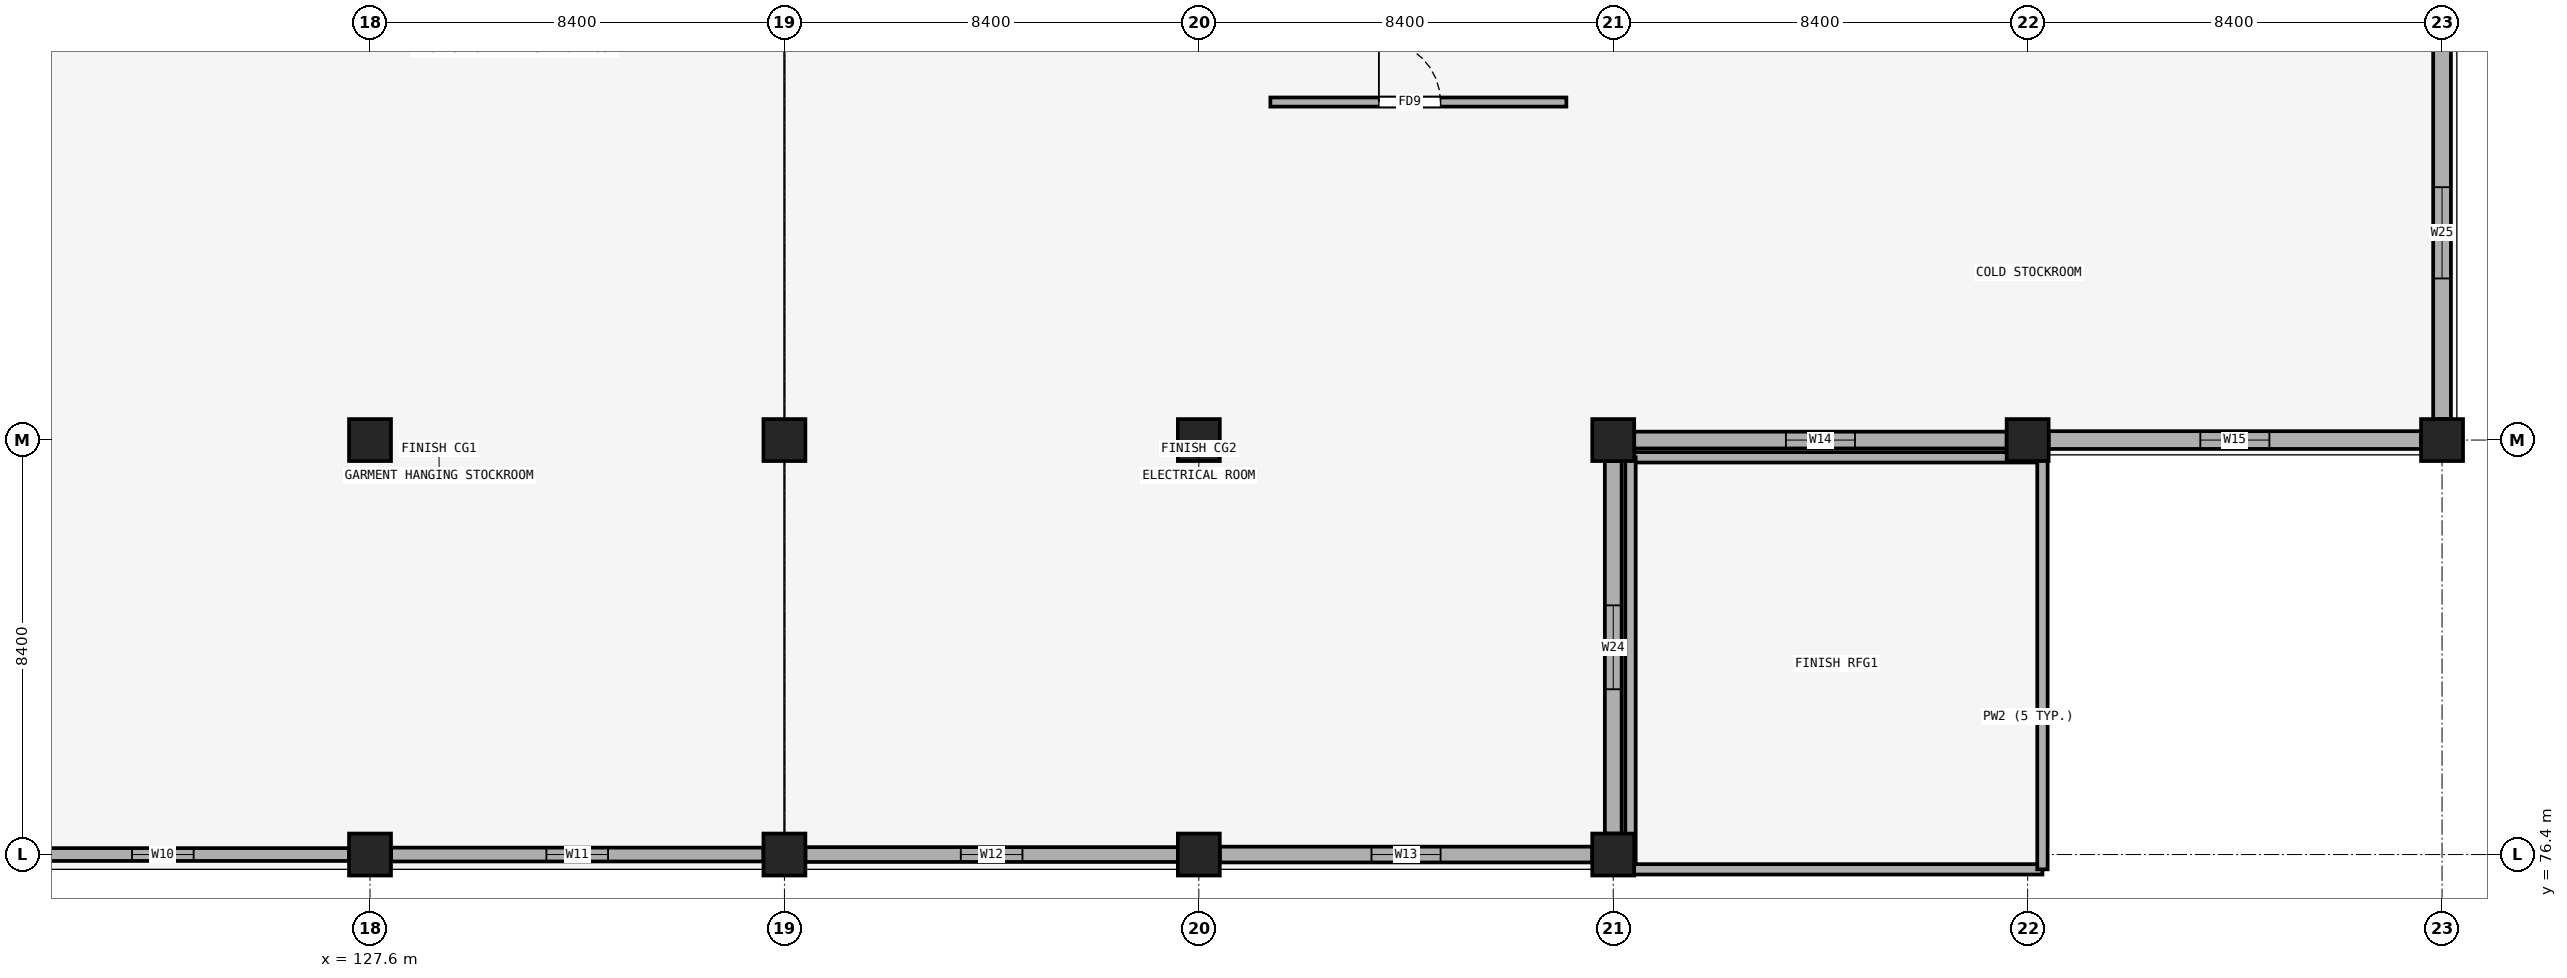
"""IFC4 building model, lengths in metres.
Left out: names, types, materials, properties, quantities, classifications, styles, units other than length and angle.
Written with IfcOpenShell. Run it as: python <this file> out.ifc"""

import sys

from ifc_helpers import new_model, si_unit, direction, frame, frame_2d, origin, origin_2d, place, context, subcontext, project, spatial, rectangle, extrude, element, fill, save


model = new_model("IFC4")
c1 = context("Model", 3, precision=1e-05, world=origin(), true_north=direction((0.0, 1.0)))
c2 = subcontext(c1, "Body", "Model", "MODEL_VIEW")
j1 = project(units=[si_unit("LENGTHUNIT", "METRE"), si_unit("PLANEANGLEUNIT", "RADIAN")], contexts=[c1])
p1 = place(None, origin())
s1 = spatial("IfcSite", under=j1, at=p1, CompositionType="ELEMENT")
p2 = place(p1, origin())
s2 = spatial("IfcBuilding", under=s1, at=p2, CompositionType="ELEMENT")
p3 = place(p2, frame((0.0, 0.0, 5.4)))
s3 = spatial("IfcBuildingStorey", under=s2, at=p3, CompositionType="ELEMENT", Elevation=5.4)
for number, where, z_axis, x_axis in (
    (1, (127.6, 76.4, 0.0), (0.0, 0.0, 1.0), (1.0, 0.0, 0.0)),
    (2, (136.0, 76.4, 0.0), (0.0, 0.0, 1.0), (1.0, 0.0, 0.0)),
    (3, (144.4, 76.4, 0.0), (0.0, 0.0, 1.0), (1.0, 0.0, 0.0)),
    (4, (152.8, 76.4, 0.0), (0.0, 0.0, 1.0), (1.0, 0.0, 0.0)),
    (5, (127.6, 84.8, 0.0), (0.0, 0.0, 1.0), (1.0, 0.0, 0.0)),
    (6, (136.0, 84.8, 0.0), (0.0, 0.0, 1.0), (1.0, 0.0, 0.0)),
    (7, (144.4, 84.8, 0.0), (0.0, 0.0, 1.0), (1.0, 0.0, 0.0)),
    (8, (152.8, 84.8, 0.0), (0.0, 0.0, 1.0), (1.0, 0.0, 0.0)),
    (9, (161.2, 84.8, 0.0), (0.0, 0.0, 1.0), (1.0, 0.0, 0.0)),
    (10, (169.6, 84.8, 0.0), (0.0, 0.0, 1.0), (1.0, 0.0, 0.0)),
):
    element("IfcColumn", number, at=place(p3, frame(where, z_axis=z_axis, x_axis=x_axis)), inside=s3, PredefinedType="COLUMN", context=c2, shape_type="SweptSolid", body=[
        extrude(rectangle(XDim=0.85, YDim=0.85, at=origin_2d()), origin(), (0.0, 0.0, 1.0), 4.5),
    ])
p4 = place(p3, frame((119.625, 76.4, 0.0), z_axis=(0.0, 0.0, 1.0), x_axis=(1.0, 0.0, 0.0)))
e11 = element("IfcWall", 11, at=p4, inside=s3, PredefinedType="SOLIDWALL", context=c2, shape_type="SweptSolid", body=[
    extrude(rectangle(XDim=7.55, YDim=0.26, at=frame_2d((3.775, 0.0))), origin(), (0.0, 0.0, 1.0), 3.45),
])
p5 = place(p4, frame((3.15, 0.0, 0.95)))
e12 = element("IfcOpeningElement", 12, at=p5, cuts=e11, PredefinedType="OPENING", context=c2, shape_type="SweptSolid", body=[
    extrude(rectangle(XDim=1.25, YDim=1.6, at=frame_2d((0.625, 0.8))), frame((0.0, 0.14, 0.0), z_axis=(0.0, -1.0, 0.0), x_axis=(1.0, 0.0, 0.0)), (0.0, 0.0, 1.0), 0.28),
])
p6 = place(p3, frame((128.025, 76.4, 0.0), z_axis=(0.0, 0.0, 1.0), x_axis=(1.0, 0.0, 0.0)))
e13 = element("IfcWall", 13, at=p6, inside=s3, PredefinedType="SOLIDWALL", context=c2, shape_type="SweptSolid", body=[
    extrude(rectangle(XDim=7.55, YDim=0.28, at=frame_2d((3.775, 0.0))), origin(), (0.0, 0.0, 1.0), 3.45),
])
p7 = place(p6, frame((3.15, 0.0, 0.95)))
e14 = element("IfcOpeningElement", 14, at=p7, cuts=e13, PredefinedType="OPENING", context=c2, shape_type="SweptSolid", body=[
    extrude(rectangle(XDim=1.25, YDim=1.85, at=frame_2d((0.625, 0.925))), frame((0.0, 0.15, 0.0), z_axis=(0.0, -1.0, 0.0), x_axis=(1.0, 0.0, 0.0)), (0.0, 0.0, 1.0), 0.3),
])
p8 = place(p3, frame((136.425, 76.4, 0.0), z_axis=(0.0, 0.0, 1.0), x_axis=(1.0, 0.0, 0.0)))
e15 = element("IfcWall", 15, at=p8, inside=s3, PredefinedType="SOLIDWALL", context=c2, shape_type="SweptSolid", body=[
    extrude(rectangle(XDim=7.55, YDim=0.3, at=frame_2d((3.775, 0.0))), origin(), (0.0, 0.0, 1.0), 3.45),
])
p9 = place(p8, frame((3.15, 0.0, 0.95)))
e16 = element("IfcOpeningElement", 16, at=p9, cuts=e15, PredefinedType="OPENING", context=c2, shape_type="SweptSolid", body=[
    extrude(rectangle(XDim=1.25, YDim=2.1, at=frame_2d((0.625, 1.05))), frame((0.0, 0.16, 0.0), z_axis=(0.0, -1.0, 0.0), x_axis=(1.0, 0.0, 0.0)), (0.0, 0.0, 1.0), 0.32),
])
p10 = place(p3, frame((144.825, 76.4, 0.0), z_axis=(0.0, 0.0, 1.0), x_axis=(1.0, 0.0, 0.0)))
e17 = element("IfcWall", 17, at=p10, inside=s3, PredefinedType="SOLIDWALL", context=c2, shape_type="SweptSolid", body=[
    extrude(rectangle(XDim=7.55, YDim=0.32, at=frame_2d((3.775, 0.0))), origin(), (0.0, 0.0, 1.0), 3.45),
])
p11 = place(p10, frame((3.075, 0.0, 0.95)))
e18 = element("IfcOpeningElement", 18, at=p11, cuts=e17, PredefinedType="OPENING", context=c2, shape_type="SweptSolid", body=[
    extrude(rectangle(XDim=1.4, YDim=1.35, at=frame_2d((0.7, 0.675))), frame((0.0, 0.17, 0.0), z_axis=(0.0, -1.0, 0.0), x_axis=(1.0, 0.0, 0.0)), (0.0, 0.0, 1.0), 0.34),
])
p12 = place(p3, frame((153.225, 84.8, 0.0), z_axis=(0.0, 0.0, 1.0), x_axis=(1.0, 0.0, 0.0)))
e19 = element("IfcWall", 19, at=p12, inside=s3, PredefinedType="SOLIDWALL", context=c2, shape_type="SweptSolid", body=[
    extrude(rectangle(XDim=7.55, YDim=0.34, at=frame_2d((3.775, 0.0))), origin(), (0.0, 0.0, 1.0), 3.45),
])
p13 = place(p12, frame((3.075, 0.0, 0.95)))
e20 = element("IfcOpeningElement", 20, at=p13, cuts=e19, PredefinedType="OPENING", context=c2, shape_type="SweptSolid", body=[
    extrude(rectangle(XDim=1.4, YDim=1.6, at=frame_2d((0.7, 0.8))), frame((0.0, 0.18, 0.0), z_axis=(0.0, -1.0, 0.0), x_axis=(1.0, 0.0, 0.0)), (0.0, 0.0, 1.0), 0.36),
])
p14 = place(p3, frame((161.625, 84.8, 0.0), z_axis=(0.0, 0.0, 1.0), x_axis=(1.0, 0.0, 0.0)))
e21 = element("IfcWall", 21, at=p14, inside=s3, PredefinedType="SOLIDWALL", context=c2, shape_type="SweptSolid", body=[
    extrude(rectangle(XDim=7.55, YDim=0.36, at=frame_2d((3.775, 0.0))), origin(), (0.0, 0.0, 1.0), 3.45),
])
p15 = place(p14, frame((3.075, 0.0, 0.95)))
e22 = element("IfcOpeningElement", 22, at=p15, cuts=e21, PredefinedType="OPENING", context=c2, shape_type="SweptSolid", body=[
    extrude(rectangle(XDim=1.4, YDim=1.85, at=frame_2d((0.7, 0.925))), frame((0.0, 0.19, 0.0), z_axis=(0.0, -1.0, 0.0), x_axis=(1.0, 0.0, 0.0)), (0.0, 0.0, 1.0), 0.38),
])
p16 = place(p3, frame((152.8, 76.825, 0.0), z_axis=(0.0, 0.0, 1.0), x_axis=(0.0, 1.0, 0.0)))
e23 = element("IfcWall", 23, at=p16, inside=s3, PredefinedType="SOLIDWALL", context=c2, shape_type="SweptSolid", body=[
    extrude(rectangle(XDim=7.55, YDim=0.34, at=frame_2d((3.775, 0.0))), origin(), (0.0, 0.0, 1.0), 3.45),
])
p17 = place(p16, frame((2.925, 0.0, 0.95)))
e24 = element("IfcOpeningElement", 24, at=p17, cuts=e23, PredefinedType="OPENING", context=c2, shape_type="SweptSolid", body=[
    extrude(rectangle(XDim=1.7, YDim=2.1, at=frame_2d((0.85, 1.05))), frame((0.0, 0.18, 0.0), z_axis=(0.0, -1.0, 0.0), x_axis=(1.0, 0.0, 0.0)), (0.0, 0.0, 1.0), 0.36),
])
p18 = place(p3, frame((169.6, 85.225, 0.0), z_axis=(0.0, 0.0, 1.0), x_axis=(0.0, 1.0, 0.0)))
e25 = element("IfcWall", 25, at=p18, inside=s3, PredefinedType="SOLIDWALL", context=c2, shape_type="SweptSolid", body=[
    extrude(rectangle(XDim=7.55, YDim=0.36, at=frame_2d((3.775, 0.0))), origin(), (0.0, 0.0, 1.0), 3.45),
])
p19 = place(p18, frame((2.85, 0.0, 0.95)))
e26 = element("IfcOpeningElement", 26, at=p19, cuts=e25, PredefinedType="OPENING", context=c2, shape_type="SweptSolid", body=[
    extrude(rectangle(XDim=1.85, YDim=1.35, at=frame_2d((0.925, 0.675))), frame((0.0, 0.19, 0.0), z_axis=(0.0, -1.0, 0.0), x_axis=(1.0, 0.0, 0.0)), (0.0, 0.0, 1.0), 0.38),
])
p20 = place(p3, frame((161.5, 84.45, 0.0), z_axis=(0.0, 0.0, 1.0), x_axis=(-1.0, 0.0, 0.0)))
e27 = element("IfcWall", 27, at=p20, inside=s3, PredefinedType="PARAPET", context=c2, shape_type="SweptSolid", body=[
    extrude(rectangle(XDim=8.35, YDim=0.21, at=frame_2d((4.175, 0.0))), origin(), (0.0, 0.0, 1.0), 0.95),
])
p21 = place(p3, frame((153.15, 84.45, 0.0), z_axis=(0.0, 0.0, 1.0), x_axis=(0.0, -1.0, 0.0)))
e28 = element("IfcWall", 28, at=p21, inside=s3, PredefinedType="PARAPET", context=c2, shape_type="SweptSolid", body=[
    extrude(rectangle(XDim=8.35, YDim=0.21, at=frame_2d((4.175, 0.0))), origin(), (0.0, 0.0, 1.0), 0.95),
])
p22 = place(p3, frame((153.15, 76.1, 0.0), z_axis=(0.0, 0.0, 1.0), x_axis=(1.0, 0.0, 0.0)))
e29 = element("IfcWall", 29, at=p22, inside=s3, PredefinedType="PARAPET", context=c2, shape_type="SweptSolid", body=[
    extrude(rectangle(XDim=8.35, YDim=0.21, at=frame_2d((4.175, 0.0))), origin(), (0.0, 0.0, 1.0), 0.95),
])
p23 = place(p3, frame((161.5, 76.1, 0.0), z_axis=(0.0, 0.0, 1.0), x_axis=(0.0, 1.0, 0.0)))
e30 = element("IfcWall", 30, at=p23, inside=s3, PredefinedType="PARAPET", context=c2, shape_type="SweptSolid", body=[
    extrude(rectangle(XDim=8.35, YDim=0.21, at=frame_2d((4.175, 0.0))), origin(), (0.0, 0.0, 1.0), 0.95),
])
p24 = place(p3, frame((145.85, 91.65, 0.0), z_axis=(0.0, 0.0, 1.0), x_axis=(1.0, 0.0, 0.0)))
e31 = element("IfcWall", 31, at=p24, inside=s3, PredefinedType="PARTITIONING", context=c2, shape_type="SweptSolid", body=[
    extrude(rectangle(XDim=6.0, YDim=0.185, at=frame_2d((3.0, 0.0))), origin(), (0.0, 0.0, 1.0), 4.2),
])
p25 = place(p24, frame((2.2, 0.0, 0.0)))
e32 = element("IfcOpeningElement", 32, at=p25, cuts=e31, PredefinedType="OPENING", context=c2, shape_type="SweptSolid", body=[
    extrude(rectangle(XDim=1.25, YDim=2.25, at=frame_2d((0.625, 1.125))), frame((0.0, 0.103, 0.0), z_axis=(0.0, -1.0, 0.0), x_axis=(1.0, 0.0, 0.0)), (0.0, 0.0, 1.0), 0.205),
])
p26 = place(p5, origin())
e33 = element("IfcWindow", 33, at=p26, inside=s3, PartitioningType="SINGLE_PANEL", PredefinedType="WINDOW", context=c2, shape_type="SweptSolid", body=[
    extrude(rectangle(XDim=1.25, YDim=1.6, at=frame_2d((0.625, 0.8))), frame((0.0, 0.03, 0.0), z_axis=(0.0, -1.0, 0.0), x_axis=(1.0, 0.0, 0.0)), (0.0, 0.0, 1.0), 0.06),
])
fill(e12, e33)
p27 = place(p7, origin())
e34 = element("IfcWindow", 34, at=p27, inside=s3, PartitioningType="SINGLE_PANEL", PredefinedType="WINDOW", context=c2, shape_type="SweptSolid", body=[
    extrude(rectangle(XDim=1.25, YDim=1.85, at=frame_2d((0.625, 0.925))), frame((0.0, 0.03, 0.0), z_axis=(0.0, -1.0, 0.0), x_axis=(1.0, 0.0, 0.0)), (0.0, 0.0, 1.0), 0.06),
])
fill(e14, e34)
p28 = place(p9, origin())
e35 = element("IfcWindow", 35, at=p28, inside=s3, PartitioningType="SINGLE_PANEL", PredefinedType="WINDOW", context=c2, shape_type="SweptSolid", body=[
    extrude(rectangle(XDim=1.25, YDim=2.1, at=frame_2d((0.625, 1.05))), frame((0.0, 0.03, 0.0), z_axis=(0.0, -1.0, 0.0), x_axis=(1.0, 0.0, 0.0)), (0.0, 0.0, 1.0), 0.06),
])
fill(e16, e35)
p29 = place(p11, origin())
e36 = element("IfcWindow", 36, at=p29, inside=s3, PartitioningType="SINGLE_PANEL", PredefinedType="WINDOW", context=c2, shape_type="SweptSolid", body=[
    extrude(rectangle(XDim=1.4, YDim=1.35, at=frame_2d((0.7, 0.675))), frame((0.0, 0.03, 0.0), z_axis=(0.0, -1.0, 0.0), x_axis=(1.0, 0.0, 0.0)), (0.0, 0.0, 1.0), 0.06),
])
fill(e18, e36)
p30 = place(p13, origin())
e37 = element("IfcWindow", 37, at=p30, inside=s3, PartitioningType="SINGLE_PANEL", PredefinedType="WINDOW", context=c2, shape_type="SweptSolid", body=[
    extrude(rectangle(XDim=1.4, YDim=1.6, at=frame_2d((0.7, 0.8))), frame((0.0, 0.03, 0.0), z_axis=(0.0, -1.0, 0.0), x_axis=(1.0, 0.0, 0.0)), (0.0, 0.0, 1.0), 0.06),
])
fill(e20, e37)
p31 = place(p15, origin())
e38 = element("IfcWindow", 38, at=p31, inside=s3, PartitioningType="SINGLE_PANEL", PredefinedType="WINDOW", context=c2, shape_type="SweptSolid", body=[
    extrude(rectangle(XDim=1.4, YDim=1.85, at=frame_2d((0.7, 0.925))), frame((0.0, 0.03, 0.0), z_axis=(0.0, -1.0, 0.0), x_axis=(1.0, 0.0, 0.0)), (0.0, 0.0, 1.0), 0.06),
])
fill(e22, e38)
p32 = place(p17, origin())
e39 = element("IfcWindow", 39, at=p32, inside=s3, PartitioningType="DOUBLE_PANEL_VERTICAL", PredefinedType="WINDOW", context=c2, shape_type="SweptSolid", body=[
    extrude(rectangle(XDim=1.7, YDim=2.1, at=frame_2d((0.85, 1.05))), frame((0.0, 0.03, 0.0), z_axis=(0.0, -1.0, 0.0), x_axis=(1.0, 0.0, 0.0)), (0.0, 0.0, 1.0), 0.06),
])
fill(e24, e39)
p33 = place(p19, origin())
e40 = element("IfcWindow", 40, at=p33, inside=s3, PartitioningType="DOUBLE_PANEL_VERTICAL", PredefinedType="WINDOW", context=c2, shape_type="SweptSolid", body=[
    extrude(rectangle(XDim=1.85, YDim=1.35, at=frame_2d((0.925, 0.675))), frame((0.0, 0.03, 0.0), z_axis=(0.0, -1.0, 0.0), x_axis=(1.0, 0.0, 0.0)), (0.0, 0.0, 1.0), 0.06),
])
fill(e26, e40)
p34 = place(p25, origin())
e41 = element("IfcDoor", 41, at=p34, inside=s3, OperationType="SINGLE_SWING_LEFT", PredefinedType="DOOR", context=c2, shape_type="SweptSolid", body=[
    extrude(rectangle(XDim=1.25, YDim=2.25, at=frame_2d((0.625, 1.125))), frame((0.0, 0.025, 0.0), z_axis=(0.0, -1.0, 0.0), x_axis=(1.0, 0.0, 0.0)), (0.0, 0.0, 1.0), 0.05),
])
fill(e32, e41)
save(model, sys.argv[1])
